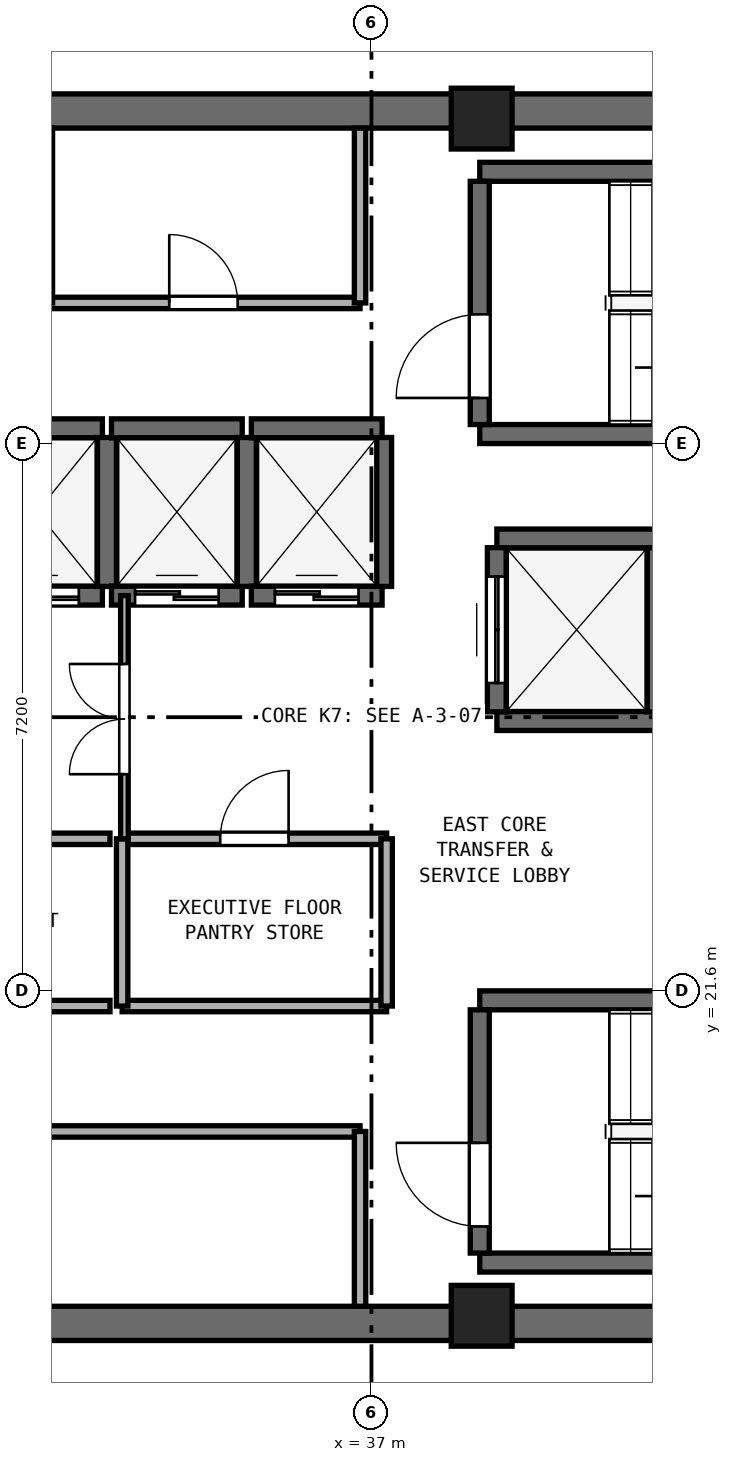
"""IFC4 building model, lengths in metres.
Left out: names, types, materials, properties, quantities, classifications, styles, units other than length and angle.
Written with IfcOpenShell. Run it as: python <this file> out.ifc"""

import sys

from ifc_helpers import new_model, si_unit, direction, frame, frame_2d, origin, origin_2d, place, context, subcontext, project, spatial, rectangle, extrude, element, fill, save


model = new_model("IFC4")
c1 = context("Model", 3, precision=1e-05, world=origin(), true_north=direction((0.0, 1.0)))
c2 = subcontext(c1, "Body", "Model", "MODEL_VIEW")
j1 = project(units=[si_unit("LENGTHUNIT", "METRE"), si_unit("PLANEANGLEUNIT", "RADIAN")], contexts=[c1])
p1 = place(None, origin())
s1 = spatial("IfcSite", under=j1, at=p1, CompositionType="ELEMENT")
p2 = place(p1, origin())
s2 = spatial("IfcBuilding", under=s1, at=p2, CompositionType="ELEMENT")
p3 = place(p2, frame((0.0, 0.0, 244.0)))
s3 = spatial("IfcBuildingStorey", under=s2, at=p3, CompositionType="ELEMENT", Elevation=244.0)
for number, where, z_axis, x_axis in (
    (1, (25.4, 17.225, 0.0), (0.0, 0.0, 1.0), (1.0, 0.0, 0.0)),
    (2, (25.4, 33.175, 0.0), (0.0, 0.0, 1.0), (1.0, 0.0, 0.0)),
):
    element("IfcWall", number, at=place(p3, frame(where, z_axis=z_axis, x_axis=x_axis)), inside=s3, PredefinedType="SHEAR", context=c2, shape_type="SweptSolid", body=[
        extrude(rectangle(XDim=23.2, YDim=0.45, at=frame_2d((11.6, 0.0))), origin(), (0.0, 0.0, 1.0), 3.51),
    ])
for number, where, z_axis, x_axis in (
    (3, (38.45, 17.325, 0.0), (0.0, 0.0, 1.0), (1.0, 0.0, 0.0)),
    (4, (38.45, 33.075, 0.0), (0.0, 0.0, 1.0), (1.0, 0.0, 0.0)),
):
    element("IfcColumn", number, at=place(p3, frame(where, z_axis=z_axis, x_axis=x_axis)), inside=s3, PredefinedType="PILASTER", context=c2, shape_type="SweptSolid", body=[
        extrude(rectangle(XDim=0.8, YDim=0.8, at=origin_2d()), origin(), (0.0, 0.0, 1.0), 3.8),
    ])
for number, where, z_axis, x_axis in (
    (5, (38.425, 28.925, 0.0), (0.0, 0.0, 1.0), (1.0, 0.0, 0.0)),
    (6, (38.425, 32.375, 0.0), (0.0, 0.0, 1.0), (1.0, 0.0, 0.0)),
):
    element("IfcWall", number, at=place(p3, frame(where, z_axis=z_axis, x_axis=x_axis)), inside=s3, PredefinedType="SHEAR", context=c2, shape_type="SweptSolid", body=[
        extrude(rectangle(XDim=7.3, YDim=0.25, at=frame_2d((3.65, 0.0))), origin(), (0.0, 0.0, 1.0), 3.51),
    ])
p4 = place(p3, frame((38.425, 29.05, 0.0), z_axis=(0.0, 0.0, 1.0), x_axis=(0.0, 1.0, 0.0)))
e7 = element("IfcWall", 7, at=p4, inside=s3, PredefinedType="SHEAR", context=c2, shape_type="SweptSolid", body=[
    extrude(rectangle(XDim=3.2, YDim=0.25, at=frame_2d((1.6, 0.0))), origin(), (0.0, 0.0, 1.0), 3.51),
])
p5 = place(p4, frame((0.35, 0.0, 0.0)))
e8 = element("IfcOpeningElement", 8, at=p5, cuts=e7, PredefinedType="OPENING", context=c2, shape_type="SweptSolid", body=[
    extrude(rectangle(XDim=1.1, YDim=2.15, at=frame_2d((0.55, 1.075))), frame((0.0, 0.135, 0.0), z_axis=(0.0, -1.0, 0.0), x_axis=(1.0, 0.0, 0.0)), (0.0, 0.0, 1.0), 0.27),
])
for number, where, z_axis, x_axis in (
    (9, (38.425, 18.025, 0.0), (0.0, 0.0, 1.0), (1.0, 0.0, 0.0)),
    (10, (38.425, 21.475, 0.0), (0.0, 0.0, 1.0), (1.0, 0.0, 0.0)),
):
    element("IfcWall", number, at=place(p3, frame(where, z_axis=z_axis, x_axis=x_axis)), inside=s3, PredefinedType="SHEAR", context=c2, shape_type="SweptSolid", body=[
        extrude(rectangle(XDim=7.3, YDim=0.25, at=frame_2d((3.65, 0.0))), origin(), (0.0, 0.0, 1.0), 3.51),
    ])
p6 = place(p3, frame((38.425, 18.15, 0.0), z_axis=(0.0, 0.0, 1.0), x_axis=(0.0, 1.0, 0.0)))
e11 = element("IfcWall", 11, at=p6, inside=s3, PredefinedType="SHEAR", context=c2, shape_type="SweptSolid", body=[
    extrude(rectangle(XDim=3.2, YDim=0.25, at=frame_2d((1.6, 0.0))), origin(), (0.0, 0.0, 1.0), 3.51),
])
p7 = place(p6, frame((0.35, 0.0, 0.0)))
e12 = element("IfcOpeningElement", 12, at=p7, cuts=e11, PredefinedType="OPENING", context=c2, shape_type="SweptSolid", body=[
    extrude(rectangle(XDim=1.1, YDim=2.15, at=frame_2d((0.55, 1.075))), frame((0.0, 0.135, 0.0), z_axis=(0.0, -1.0, 0.0), x_axis=(1.0, 0.0, 0.0)), (0.0, 0.0, 1.0), 0.27),
])
p8 = place(p3, frame((31.74, 26.8, 0.0), z_axis=(0.0, 0.0, 1.0), x_axis=(1.0, 0.0, 0.0)))
e13 = element("IfcWall", 13, at=p8, inside=s3, PredefinedType="SHEAR", context=c2, shape_type="SweptSolid", body=[
    extrude(rectangle(XDim=1.72, YDim=0.25, at=frame_2d((0.86, 0.0))), origin(), (0.0, 0.0, 1.0), 3.51),
])
p9 = place(p8, frame((0.31, 0.0, 0.0)))
e14 = element("IfcOpeningElement", 14, at=p9, cuts=e13, PredefinedType="OPENING", context=c2, shape_type="SweptSolid", body=[
    extrude(rectangle(XDim=1.1, YDim=2.15, at=frame_2d((0.55, 1.075))), frame((0.0, 0.135, 0.0), z_axis=(0.0, -1.0, 0.0), x_axis=(1.0, 0.0, 0.0)), (0.0, 0.0, 1.0), 0.27),
])
p10 = place(p3, frame((31.74, 29.0, 0.0), z_axis=(0.0, 0.0, 1.0), x_axis=(1.0, 0.0, 0.0)))
e15 = element("IfcWall", 15, at=p10, inside=s3, PredefinedType="SHEAR", context=c2, shape_type="SweptSolid", body=[
    extrude(rectangle(XDim=1.72, YDim=0.25, at=frame_2d((0.86, 0.0))), origin(), (0.0, 0.0, 1.0), 3.51),
])
p11 = place(p3, frame((33.52, 26.92, 0.0), z_axis=(0.0, 0.0, 1.0), x_axis=(0.0, 1.0, 0.0)))
e16 = element("IfcWall", 16, at=p11, inside=s3, PredefinedType="SHEAR", context=c2, shape_type="SweptSolid", body=[
    extrude(rectangle(XDim=1.96, YDim=0.25, at=frame_2d((0.98, 0.0))), origin(), (0.0, 0.0, 1.0), 3.51),
])
p12 = place(p3, frame((33.58, 26.8, 0.0), z_axis=(0.0, 0.0, 1.0), x_axis=(1.0, 0.0, 0.0)))
e17 = element("IfcWall", 17, at=p12, inside=s3, PredefinedType="SHEAR", context=c2, shape_type="SweptSolid", body=[
    extrude(rectangle(XDim=1.72, YDim=0.25, at=frame_2d((0.86, 0.0))), origin(), (0.0, 0.0, 1.0), 3.51),
])
p13 = place(p12, frame((0.31, 0.0, 0.0)))
e18 = element("IfcOpeningElement", 18, at=p13, cuts=e17, PredefinedType="OPENING", context=c2, shape_type="SweptSolid", body=[
    extrude(rectangle(XDim=1.1, YDim=2.15, at=frame_2d((0.55, 1.075))), frame((0.0, 0.135, 0.0), z_axis=(0.0, -1.0, 0.0), x_axis=(1.0, 0.0, 0.0)), (0.0, 0.0, 1.0), 0.27),
])
p14 = place(p3, frame((33.58, 29.0, 0.0), z_axis=(0.0, 0.0, 1.0), x_axis=(1.0, 0.0, 0.0)))
e19 = element("IfcWall", 19, at=p14, inside=s3, PredefinedType="SHEAR", context=c2, shape_type="SweptSolid", body=[
    extrude(rectangle(XDim=1.72, YDim=0.25, at=frame_2d((0.86, 0.0))), origin(), (0.0, 0.0, 1.0), 3.51),
])
p15 = place(p3, frame((35.36, 26.92, 0.0), z_axis=(0.0, 0.0, 1.0), x_axis=(0.0, 1.0, 0.0)))
e20 = element("IfcWall", 20, at=p15, inside=s3, PredefinedType="SHEAR", context=c2, shape_type="SweptSolid", body=[
    extrude(rectangle(XDim=1.96, YDim=0.25, at=frame_2d((0.98, 0.0))), origin(), (0.0, 0.0, 1.0), 3.51),
])
p16 = place(p3, frame((35.42, 26.8, 0.0), z_axis=(0.0, 0.0, 1.0), x_axis=(1.0, 0.0, 0.0)))
e21 = element("IfcWall", 21, at=p16, inside=s3, PredefinedType="SHEAR", context=c2, shape_type="SweptSolid", body=[
    extrude(rectangle(XDim=1.72, YDim=0.25, at=frame_2d((0.86, 0.0))), origin(), (0.0, 0.0, 1.0), 3.51),
])
p17 = place(p16, frame((0.31, 0.0, 0.0)))
e22 = element("IfcOpeningElement", 22, at=p17, cuts=e21, PredefinedType="OPENING", context=c2, shape_type="SweptSolid", body=[
    extrude(rectangle(XDim=1.1, YDim=2.15, at=frame_2d((0.55, 1.075))), frame((0.0, 0.135, 0.0), z_axis=(0.0, -1.0, 0.0), x_axis=(1.0, 0.0, 0.0)), (0.0, 0.0, 1.0), 0.27),
])
p18 = place(p3, frame((35.42, 29.0, 0.0), z_axis=(0.0, 0.0, 1.0), x_axis=(1.0, 0.0, 0.0)))
e23 = element("IfcWall", 23, at=p18, inside=s3, PredefinedType="SHEAR", context=c2, shape_type="SweptSolid", body=[
    extrude(rectangle(XDim=1.72, YDim=0.25, at=frame_2d((0.86, 0.0))), origin(), (0.0, 0.0, 1.0), 3.51),
])
p19 = place(p3, frame((37.14, 26.92, 0.0), z_axis=(0.0, 0.0, 1.0), x_axis=(0.0, 1.0, 0.0)))
e24 = element("IfcWall", 24, at=p19, inside=s3, PredefinedType="SHEAR", context=c2, shape_type="SweptSolid", body=[
    extrude(rectangle(XDim=1.96, YDim=0.25, at=frame_2d((0.98, 0.0))), origin(), (0.0, 0.0, 1.0), 3.51),
])
for number, where, z_axis, x_axis in (
    (25, (38.65, 25.15, 0.0), (0.0, 0.0, 1.0), (1.0, 0.0, 0.0)),
    (26, (38.65, 27.55, 0.0), (0.0, 0.0, 1.0), (1.0, 0.0, 0.0)),
):
    element("IfcWall", number, at=place(p3, frame(where, z_axis=z_axis, x_axis=x_axis)), inside=s3, PredefinedType="SHEAR", context=c2, shape_type="SweptSolid", body=[
        extrude(rectangle(XDim=2.1, YDim=0.25, at=frame_2d((1.05, 0.0))), origin(), (0.0, 0.0, 1.0), 3.51),
    ])
p20 = place(p3, frame((38.65, 25.27, 0.0), z_axis=(0.0, 0.0, 1.0), x_axis=(0.0, 1.0, 0.0)))
e27 = element("IfcWall", 27, at=p20, inside=s3, PredefinedType="SHEAR", context=c2, shape_type="SweptSolid", body=[
    extrude(rectangle(XDim=2.16, YDim=0.25, at=frame_2d((1.08, 0.0))), origin(), (0.0, 0.0, 1.0), 3.51),
])
p21 = place(p20, frame((0.38, 0.0, 0.0)))
e28 = element("IfcOpeningElement", 28, at=p21, cuts=e27, PredefinedType="OPENING", context=c2, shape_type="SweptSolid", body=[
    extrude(rectangle(XDim=1.4, YDim=2.2, at=frame_2d((0.7, 1.1))), frame((0.0, 0.135, 0.0), z_axis=(0.0, -1.0, 0.0), x_axis=(1.0, 0.0, 0.0)), (0.0, 0.0, 1.0), 0.27),
])
p22 = place(p3, frame((40.75, 25.27, 0.0), z_axis=(0.0, 0.0, 1.0), x_axis=(0.0, 1.0, 0.0)))
e29 = element("IfcWall", 29, at=p22, inside=s3, PredefinedType="SHEAR", context=c2, shape_type="SweptSolid", body=[
    extrude(rectangle(XDim=2.16, YDim=0.25, at=frame_2d((1.08, 0.0))), origin(), (0.0, 0.0, 1.0), 3.51),
])
p23 = place(p3, frame((32.73, 30.65, 0.0), z_axis=(0.0, 0.0, 1.0), x_axis=(1.0, 0.0, 0.0)))
e30 = element("IfcWall", 30, at=p23, inside=s3, PredefinedType="PARTITIONING", context=c2, shape_type="SweptSolid", body=[
    extrude(rectangle(XDim=4.12, YDim=0.15, at=frame_2d((2.06, 0.0))), origin(), (0.0, 0.0, 1.0), 3.51),
])
p24 = place(p23, frame((1.61, 0.0, 0.0)))
e31 = element("IfcOpeningElement", 31, at=p24, cuts=e30, PredefinedType="OPENING", context=c2, shape_type="SweptSolid", body=[
    extrude(rectangle(XDim=0.9, YDim=2.1, at=frame_2d((0.45, 1.05))), frame((0.0, 0.085, 0.0), z_axis=(0.0, -1.0, 0.0), x_axis=(1.0, 0.0, 0.0)), (0.0, 0.0, 1.0), 0.17),
])
for number, where, z_axis, x_axis in (
    (32, (32.73, 30.65, 0.0), (0.0, 0.0, 1.0), (0.0, 1.0, 0.0)),
    (33, (36.85, 30.65, 0.0), (0.0, 0.0, 1.0), (0.0, 1.0, 0.0)),
):
    element("IfcWall", number, at=place(p3, frame(where, z_axis=z_axis, x_axis=x_axis)), inside=s3, PredefinedType="PARTITIONING", context=c2, shape_type="SweptSolid", body=[
        extrude(rectangle(XDim=2.3, YDim=0.15, at=frame_2d((1.15, 0.0))), origin(), (0.0, 0.0, 1.0), 3.51),
    ])
p25 = place(p3, frame((25.97, 19.75, 0.0), z_axis=(0.0, 0.0, 1.0), x_axis=(1.0, 0.0, 0.0)))
e34 = element("IfcWall", 34, at=p25, inside=s3, PredefinedType="PARTITIONING", context=c2, shape_type="SweptSolid", body=[
    extrude(rectangle(XDim=10.88, YDim=0.15, at=frame_2d((5.44, 0.0))), origin(), (0.0, 0.0, 1.0), 3.51),
])
p26 = place(p25, frame((4.965, 0.0, 0.0)))
e35 = element("IfcOpeningElement", 35, at=p26, cuts=e34, PredefinedType="OPENING", context=c2, shape_type="SweptSolid", body=[
    extrude(rectangle(XDim=0.95, YDim=2.1, at=frame_2d((0.475, 1.05))), frame((0.0, 0.085, 0.0), z_axis=(0.0, -1.0, 0.0), x_axis=(1.0, 0.0, 0.0)), (0.0, 0.0, 1.0), 0.17),
])
p27 = place(p3, frame((36.85, 17.45, 0.0), z_axis=(0.0, 0.0, 1.0), x_axis=(0.0, 1.0, 0.0)))
e36 = element("IfcWall", 36, at=p27, inside=s3, PredefinedType="PARTITIONING", context=c2, shape_type="SweptSolid", body=[
    extrude(rectangle(XDim=2.3, YDim=0.15, at=frame_2d((1.15, 0.0))), origin(), (0.0, 0.0, 1.0), 3.51),
])
p28 = place(p3, frame((30.08, 21.4, 0.0), z_axis=(0.0, 0.0, 1.0), x_axis=(1.0, 0.0, 0.0)))
e37 = element("IfcWall", 37, at=p28, inside=s3, PredefinedType="PARTITIONING", context=c2, shape_type="SweptSolid", body=[
    extrude(rectangle(XDim=3.48, YDim=0.15, at=frame_2d((1.74, 0.0))), origin(), (0.0, 0.0, 1.0), 3.51),
])
p29 = place(p3, frame((30.08, 23.6, 0.0), z_axis=(0.0, 0.0, 1.0), x_axis=(1.0, 0.0, 0.0)))
e38 = element("IfcWall", 38, at=p29, inside=s3, PredefinedType="PARTITIONING", context=c2, shape_type="SweptSolid", body=[
    extrude(rectangle(XDim=3.48, YDim=0.15, at=frame_2d((1.74, 0.0))), origin(), (0.0, 0.0, 1.0), 3.51),
])
p30 = place(p29, frame((1.29, 0.0, 0.0)))
e39 = element("IfcOpeningElement", 39, at=p30, cuts=e38, PredefinedType="OPENING", context=c2, shape_type="SweptSolid", body=[
    extrude(rectangle(XDim=0.9, YDim=2.1, at=frame_2d((0.45, 1.05))), frame((0.0, 0.085, 0.0), z_axis=(0.0, -1.0, 0.0), x_axis=(1.0, 0.0, 0.0)), (0.0, 0.0, 1.0), 0.17),
])
p31 = place(p3, frame((33.72, 21.4, 0.0), z_axis=(0.0, 0.0, 1.0), x_axis=(1.0, 0.0, 0.0)))
e40 = element("IfcWall", 40, at=p31, inside=s3, PredefinedType="PARTITIONING", context=c2, shape_type="SweptSolid", body=[
    extrude(rectangle(XDim=3.48, YDim=0.15, at=frame_2d((1.74, 0.0))), origin(), (0.0, 0.0, 1.0), 3.51),
])
p32 = place(p3, frame((33.72, 23.6, 0.0), z_axis=(0.0, 0.0, 1.0), x_axis=(1.0, 0.0, 0.0)))
e41 = element("IfcWall", 41, at=p32, inside=s3, PredefinedType="PARTITIONING", context=c2, shape_type="SweptSolid", body=[
    extrude(rectangle(XDim=3.48, YDim=0.15, at=frame_2d((1.74, 0.0))), origin(), (0.0, 0.0, 1.0), 3.51),
])
p33 = place(p32, frame((1.29, 0.0, 0.0)))
e42 = element("IfcOpeningElement", 42, at=p33, cuts=e41, PredefinedType="OPENING", context=c2, shape_type="SweptSolid", body=[
    extrude(rectangle(XDim=0.9, YDim=2.1, at=frame_2d((0.45, 1.05))), frame((0.0, 0.085, 0.0), z_axis=(0.0, -1.0, 0.0), x_axis=(1.0, 0.0, 0.0)), (0.0, 0.0, 1.0), 0.17),
])
for number, where, z_axis, x_axis in (
    (43, (33.72, 21.4, 0.0), (0.0, 0.0, 1.0), (0.0, 1.0, 0.0)),
    (44, (37.2, 21.4, 0.0), (0.0, 0.0, 1.0), (0.0, 1.0, 0.0)),
):
    element("IfcWall", number, at=place(p3, frame(where, z_axis=z_axis, x_axis=x_axis)), inside=s3, PredefinedType="PARTITIONING", context=c2, shape_type="SweptSolid", body=[
        extrude(rectangle(XDim=2.2, YDim=0.15, at=frame_2d((1.1, 0.0))), origin(), (0.0, 0.0, 1.0), 3.51),
    ])
p34 = place(p3, frame((33.75, 23.6, 0.0), z_axis=(0.0, 0.0, 1.0), x_axis=(0.0, 1.0, 0.0)))
e45 = element("IfcWall", 45, at=p34, inside=s3, PredefinedType="PARTITIONING", context=c2, shape_type="SweptSolid", body=[
    extrude(rectangle(XDim=3.2, YDim=0.1, at=frame_2d((1.6, 0.0))), origin(), (0.0, 0.0, 1.0), 3.51),
])
p35 = place(p34, frame((0.85, 0.0, 0.0)))
e46 = element("IfcOpeningElement", 46, at=p35, cuts=e45, PredefinedType="OPENING", context=c2, shape_type="SweptSolid", body=[
    extrude(rectangle(XDim=1.45, YDim=2.12, at=frame_2d((0.725, 1.06))), frame((0.0, 0.06, 0.0), z_axis=(0.0, -1.0, 0.0), x_axis=(1.0, 0.0, 0.0)), (0.0, 0.0, 1.0), 0.12),
])
p36 = place(p5, origin())
e47 = element("IfcDoor", 47, at=p36, inside=s3, OperationType="SINGLE_SWING_LEFT", PredefinedType="DOOR", context=c2, shape_type="SweptSolid", body=[
    extrude(rectangle(XDim=1.1, YDim=2.15, at=frame_2d((0.55, 1.075))), frame((0.0, 0.025, 0.0), z_axis=(0.0, -1.0, 0.0), x_axis=(1.0, 0.0, 0.0)), (0.0, 0.0, 1.0), 0.05),
])
fill(e8, e47)
p37 = place(p7, origin())
e48 = element("IfcDoor", 48, at=p37, inside=s3, OperationType="SINGLE_SWING_RIGHT", PredefinedType="DOOR", context=c2, shape_type="SweptSolid", body=[
    extrude(rectangle(XDim=1.1, YDim=2.15, at=frame_2d((0.55, 1.075))), frame((0.0, 0.025, 0.0), z_axis=(0.0, -1.0, 0.0), x_axis=(1.0, 0.0, 0.0)), (0.0, 0.0, 1.0), 0.05),
])
fill(e12, e48)
p38 = place(p9, origin())
e49 = element("IfcDoor", 49, at=p38, inside=s3, OperationType="DOUBLE_DOOR_SLIDING", PredefinedType="DOOR", context=c2, shape_type="SweptSolid", body=[
    extrude(rectangle(XDim=1.1, YDim=2.15, at=frame_2d((0.55, 1.075))), frame((0.0, 0.025, 0.0), z_axis=(0.0, -1.0, 0.0), x_axis=(1.0, 0.0, 0.0)), (0.0, 0.0, 1.0), 0.05),
])
fill(e14, e49)
p39 = place(p13, origin())
e50 = element("IfcDoor", 50, at=p39, inside=s3, OperationType="DOUBLE_DOOR_SLIDING", PredefinedType="DOOR", context=c2, shape_type="SweptSolid", body=[
    extrude(rectangle(XDim=1.1, YDim=2.15, at=frame_2d((0.55, 1.075))), frame((0.0, 0.025, 0.0), z_axis=(0.0, -1.0, 0.0), x_axis=(1.0, 0.0, 0.0)), (0.0, 0.0, 1.0), 0.05),
])
fill(e18, e50)
p40 = place(p17, origin())
e51 = element("IfcDoor", 51, at=p40, inside=s3, OperationType="DOUBLE_DOOR_SLIDING", PredefinedType="DOOR", context=c2, shape_type="SweptSolid", body=[
    extrude(rectangle(XDim=1.1, YDim=2.15, at=frame_2d((0.55, 1.075))), frame((0.0, 0.025, 0.0), z_axis=(0.0, -1.0, 0.0), x_axis=(1.0, 0.0, 0.0)), (0.0, 0.0, 1.0), 0.05),
])
fill(e22, e51)
p41 = place(p21, origin())
e52 = element("IfcDoor", 52, at=p41, inside=s3, OperationType="DOUBLE_DOOR_SLIDING", PredefinedType="DOOR", context=c2, shape_type="SweptSolid", body=[
    extrude(rectangle(XDim=1.4, YDim=2.2, at=frame_2d((0.7, 1.1))), frame((0.0, 0.025, 0.0), z_axis=(0.0, -1.0, 0.0), x_axis=(1.0, 0.0, 0.0)), (0.0, 0.0, 1.0), 0.05),
])
fill(e28, e52)
p42 = place(p24, origin())
e53 = element("IfcDoor", 53, at=p42, inside=s3, OperationType="SINGLE_SWING_LEFT", PredefinedType="DOOR", context=c2, shape_type="SweptSolid", body=[
    extrude(rectangle(XDim=0.9, YDim=2.1, at=frame_2d((0.45, 1.05))), frame((0.0, 0.025, 0.0), z_axis=(0.0, -1.0, 0.0), x_axis=(1.0, 0.0, 0.0)), (0.0, 0.0, 1.0), 0.05),
])
fill(e31, e53)
p43 = place(p33, origin())
e54 = element("IfcDoor", 54, at=p43, inside=s3, OperationType="SINGLE_SWING_RIGHT", PredefinedType="DOOR", context=c2, shape_type="SweptSolid", body=[
    extrude(rectangle(XDim=0.9, YDim=2.1, at=frame_2d((0.45, 1.05))), frame((0.0, 0.025, 0.0), z_axis=(0.0, -1.0, 0.0), x_axis=(1.0, 0.0, 0.0)), (0.0, 0.0, 1.0), 0.05),
])
fill(e42, e54)
p44 = place(p35, origin())
e55 = element("IfcDoor", 55, at=p44, inside=s3, OperationType="DOUBLE_DOOR_SINGLE_SWING", PredefinedType="DOOR", context=c2, shape_type="SweptSolid", body=[
    extrude(rectangle(XDim=1.45, YDim=2.12, at=frame_2d((0.725, 1.06))), frame((0.0, 0.025, 0.0), z_axis=(0.0, -1.0, 0.0), x_axis=(1.0, 0.0, 0.0)), (0.0, 0.0, 1.0), 0.05),
])
fill(e46, e55)
save(model, sys.argv[1])
